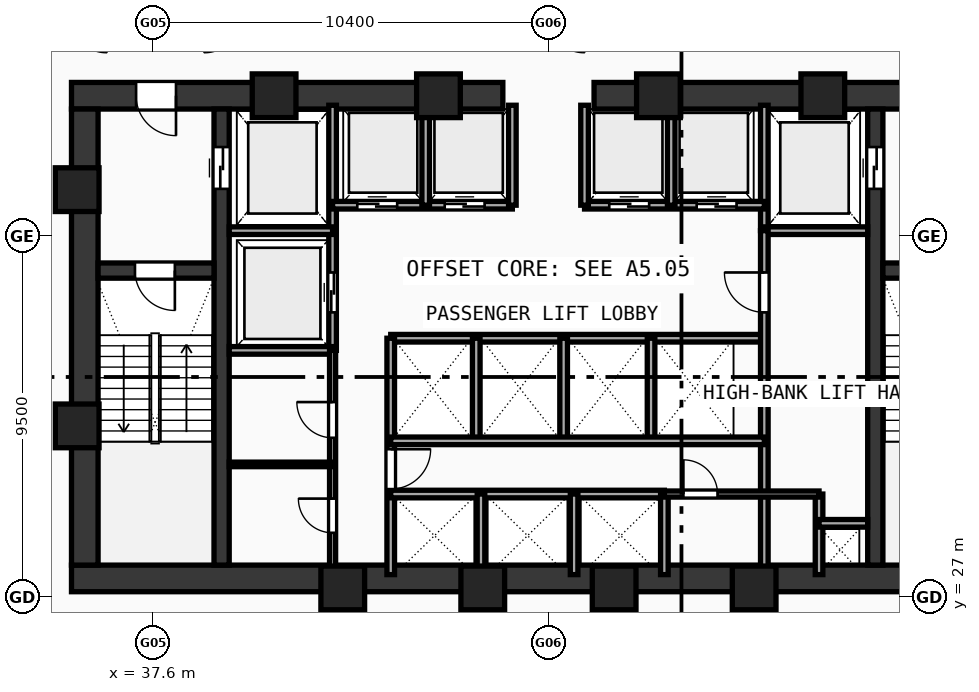
"""IFC4 building model, lengths in metres.
Left out: names, types, materials, properties, quantities, classifications, styles, units other than length and angle.
Written with IfcOpenShell. Run it as: python <this file> out.ifc"""

import sys

from ifc_helpers import new_model, si_unit, direction, frame, frame_2d, origin, origin_with_axes, origin_2d, place, context, subcontext, project, spatial, rectangle, hollow_rectangle, extrude, source, transform, mapped, element, fill, save


model = new_model("IFC4")
c1 = context("Model", 3, precision=1e-05, world=origin(), true_north=direction((0.0, 1.0)))
c2 = subcontext(c1, "Body", "Model", "MODEL_VIEW")
j1 = project(units=[si_unit("LENGTHUNIT", "METRE"), si_unit("PLANEANGLEUNIT", "RADIAN")], contexts=[c1])
p1 = place(None, origin())
s1 = spatial("IfcSite", under=j1, at=p1, CompositionType="ELEMENT")
p2 = place(p1, origin())
s2 = spatial("IfcBuilding", under=s1, at=p2, CompositionType="ELEMENT")
p3 = place(p2, frame((0.0, 0.0, 41.29)))
s3 = spatial("IfcBuildingStorey", under=s2, at=p3, CompositionType="ELEMENT", Elevation=41.29)
p4 = place(p3, frame((35.45, 27.5, 0.0), z_axis=(0.0, 0.0, 1.0), x_axis=(1.0, 0.0, 0.0)))
e1 = element("IfcWall", 1, at=p4, inside=s3, PredefinedType="SHEAR", context=c2, shape_type="SweptSolid", body=[
    extrude(rectangle(XDim=25.1, YDim=0.7, at=frame_2d((12.55, 0.0))), origin(), (0.0, 0.0, 1.0), 3.37),
])
p5 = place(p3, frame((35.45, 40.2, 0.0), z_axis=(0.0, 0.0, 1.0), x_axis=(1.0, 0.0, 0.0)))
e2 = element("IfcWall", 2, at=p5, inside=s3, PredefinedType="SHEAR", context=c2, shape_type="SweptSolid", body=[
    extrude(rectangle(XDim=11.35, YDim=0.7, at=frame_2d((5.675, 0.0))), origin(), (0.0, 0.0, 1.0), 3.37),
])
p6 = place(p5, frame((1.7, 0.0, 0.0)))
e3 = element("IfcOpeningElement", 3, at=p6, cuts=e2, PredefinedType="OPENING", context=c2, shape_type="SweptSolid", body=[
    extrude(rectangle(XDim=1.05, YDim=2.1, at=frame_2d((0.525, 1.05))), frame((0.0, 0.36, 0.0), z_axis=(0.0, -1.0, 0.0), x_axis=(1.0, 0.0, 0.0)), (0.0, 0.0, 1.0), 0.72),
])
p7 = place(p3, frame((49.2, 40.2, 0.0), z_axis=(0.0, 0.0, 1.0), x_axis=(1.0, 0.0, 0.0)))
e4 = element("IfcWall", 4, at=p7, inside=s3, PredefinedType="SHEAR", context=c2, shape_type="SweptSolid", body=[
    extrude(rectangle(XDim=11.35, YDim=0.7, at=frame_2d((5.675, 0.0))), origin(), (0.0, 0.0, 1.0), 3.37),
])
p8 = place(p7, frame((8.6, 0.0, 0.0)))
e5 = element("IfcOpeningElement", 5, at=p8, cuts=e4, PredefinedType="OPENING", context=c2, shape_type="SweptSolid", body=[
    extrude(rectangle(XDim=1.05, YDim=2.1, at=frame_2d((0.525, 1.05))), frame((0.0, 0.36, 0.0), z_axis=(0.0, -1.0, 0.0), x_axis=(1.0, 0.0, 0.0)), (0.0, 0.0, 1.0), 0.72),
])
p9 = place(p3, frame((35.8, 27.85, 0.0), z_axis=(0.0, 0.0, 1.0), x_axis=(0.0, 1.0, 0.0)))
e6 = element("IfcWall", 6, at=p9, inside=s3, PredefinedType="SHEAR", context=c2, shape_type="SweptSolid", body=[
    extrude(rectangle(XDim=12.0, YDim=0.7, at=frame_2d((6.0, 0.0))), origin(), (0.0, 0.0, 1.0), 3.37),
])
p10 = place(p3, frame((39.4, 27.85, 0.0), z_axis=(0.0, 0.0, 1.0), x_axis=(0.0, 1.0, 0.0)))
e7 = element("IfcWall", 7, at=p10, inside=s3, PredefinedType="SHEAR", context=c2, shape_type="SweptSolid", body=[
    extrude(rectangle(XDim=12.0, YDim=0.4, at=frame_2d((6.0, 0.0))), origin(), (0.0, 0.0, 1.0), 3.37),
])
p11 = place(p10, frame((9.9, 0.0, 0.0)))
e8 = element("IfcOpeningElement", 8, at=p11, cuts=e7, PredefinedType="OPENING", context=c2, shape_type="SweptSolid", body=[
    extrude(rectangle(XDim=1.1, YDim=2.1, at=frame_2d((0.55, 1.05))), frame((0.0, 0.21, 0.0), z_axis=(0.0, -1.0, 0.0), x_axis=(1.0, 0.0, 0.0)), (0.0, 0.0, 1.0), 0.42),
])
p12 = place(p3, frame((56.6, 27.85, 0.0), z_axis=(0.0, 0.0, 1.0), x_axis=(0.0, 1.0, 0.0)))
e9 = element("IfcWall", 9, at=p12, inside=s3, PredefinedType="SHEAR", context=c2, shape_type="SweptSolid", body=[
    extrude(rectangle(XDim=12.0, YDim=0.4, at=frame_2d((6.0, 0.0))), origin(), (0.0, 0.0, 1.0), 3.37),
])
p13 = place(p12, frame((9.9, 0.0, 0.0)))
e10 = element("IfcOpeningElement", 10, at=p13, cuts=e9, PredefinedType="OPENING", context=c2, shape_type="SweptSolid", body=[
    extrude(rectangle(XDim=1.1, YDim=2.1, at=frame_2d((0.55, 1.05))), frame((0.0, 0.21, 0.0), z_axis=(0.0, -1.0, 0.0), x_axis=(1.0, 0.0, 0.0)), (0.0, 0.0, 1.0), 0.42),
])
p14 = place(p3, frame((36.15, 35.6, 0.0), z_axis=(0.0, 0.0, 1.0), x_axis=(1.0, 0.0, 0.0)))
e11 = element("IfcWall", 11, at=p14, inside=s3, PredefinedType="SHEAR", context=c2, shape_type="SweptSolid", body=[
    extrude(rectangle(XDim=3.05, YDim=0.4, at=frame_2d((1.525, 0.0))), origin(), (0.0, 0.0, 1.0), 3.37),
])
p15 = place(p14, frame((0.97, 0.0, 0.0)))
e12 = element("IfcOpeningElement", 12, at=p15, cuts=e11, PredefinedType="OPENING", context=c2, shape_type="SweptSolid", body=[
    extrude(rectangle(XDim=1.05, YDim=2.1, at=frame_2d((0.525, 1.05))), frame((0.0, 0.21, 0.0), z_axis=(0.0, -1.0, 0.0), x_axis=(1.0, 0.0, 0.0)), (0.0, 0.0, 1.0), 0.42),
])
p16 = place(p3, frame((56.8, 35.6, 0.0), z_axis=(0.0, 0.0, 1.0), x_axis=(1.0, 0.0, 0.0)))
e13 = element("IfcWall", 13, at=p16, inside=s3, PredefinedType="SHEAR", context=c2, shape_type="SweptSolid", body=[
    extrude(rectangle(XDim=3.05, YDim=0.4, at=frame_2d((1.525, 0.0))), origin(), (0.0, 0.0, 1.0), 3.37),
])
p17 = place(p16, frame((1.02, 0.0, 0.0)))
e14 = element("IfcOpeningElement", 14, at=p17, cuts=e13, PredefinedType="OPENING", context=c2, shape_type="SweptSolid", body=[
    extrude(rectangle(XDim=1.05, YDim=2.1, at=frame_2d((0.525, 1.05))), frame((0.0, 0.21, 0.0), z_axis=(0.0, -1.0, 0.0), x_axis=(1.0, 0.0, 0.0)), (0.0, 0.0, 1.0), 0.42),
])
m1 = source(origin(), c2, "Body", "SweptSolid", [
    extrude(hollow_rectangle(XDim=1.15, YDim=1.15, WallThickness=0.048, at=origin_2d()), origin(), (0.0, 0.0, 1.0), 3.63),
])
for number, where, z_axis, x_axis in (
    (15, (42.588, 27.25, -0.26), (0.0, 0.0, 1.0), (1.0, 0.0, 0.0)),
    (16, (46.272, 27.25, -0.26), (0.0, 0.0, 1.0), (1.0, 0.0, 0.0)),
    (17, (49.729, 27.25, -0.26), (0.0, 0.0, 1.0), (1.0, 0.0, 0.0)),
    (18, (53.412, 27.25, -0.26), (0.0, 0.0, 1.0), (1.0, 0.0, 0.0)),
    (19, (55.219, 40.2, -0.26), (0.0, 0.0, 1.0), (1.0, 0.0, 0.0)),
    (20, (50.894, 40.2, -0.26), (0.0, 0.0, 1.0), (1.0, 0.0, 0.0)),
    (21, (45.106, 40.2, -0.26), (0.0, 0.0, 1.0), (1.0, 0.0, 0.0)),
    (22, (40.781, 40.2, -0.26), (0.0, 0.0, 1.0), (1.0, 0.0, 0.0)),
    (23, (35.6, 37.729, -0.26), (0.0, 0.0, 1.0), (1.0, 0.0, 0.0)),
    (24, (35.6, 31.513, -0.26), (0.0, 0.0, 1.0), (1.0, 0.0, 0.0)),
):
    element("IfcColumn", number, at=place(p3, frame(where, z_axis=z_axis, x_axis=x_axis)), inside=s3, PredefinedType="COLUMN", context=c2, shape_type="MappedRepresentation", body=[
        mapped(m1, transform((0.0, 0.0, 0.0), scale=1.0)),
    ])
p18 = place(p3, frame((42.32, 33.5, 0.0), z_axis=(0.0, 0.0, 1.0), x_axis=(0.0, 1.0, 0.0)))
e25 = element("IfcWall", 25, at=p18, inside=s3, PredefinedType="SOLIDWALL", context=c2, shape_type="SweptSolid", body=[
    extrude(rectangle(XDim=6.45, YDim=0.2, at=frame_2d((3.225, 0.0))), origin(), (0.0, 0.0, 1.0), 3.37),
])
p19 = place(p18, frame((1.0, 0.0, 0.0)))
e26 = element("IfcOpeningElement", 26, at=p19, cuts=e25, PredefinedType="OPENING", context=c2, shape_type="SweptSolid", body=[
    extrude(rectangle(XDim=1.05, YDim=2.1, at=frame_2d((0.525, 1.05))), frame((0.0, 0.11, 0.0), z_axis=(0.0, -1.0, 0.0), x_axis=(1.0, 0.0, 0.0)), (0.0, 0.0, 1.0), 0.22),
])
for number, where, z_axis, x_axis in (
    (27, (39.6, 36.65, 0.0), (0.0, 0.0, 1.0), (1.0, 0.0, 0.0)),
    (28, (39.6, 33.5, 0.0), (0.0, 0.0, 1.0), (1.0, 0.0, 0.0)),
):
    element("IfcWall", number, at=place(p3, frame(where, z_axis=z_axis, x_axis=x_axis)), inside=s3, PredefinedType="SOLIDWALL", context=c2, shape_type="SweptSolid", body=[
        extrude(rectangle(XDim=2.72, YDim=0.2, at=frame_2d((1.36, 0.0))), origin(), (0.0, 0.0, 1.0), 3.37),
    ])
p20 = place(p3, frame((53.68, 36.65, 0.0), z_axis=(0.0, 0.0, 1.0), x_axis=(0.0, 1.0, 0.0)))
e29 = element("IfcWall", 29, at=p20, inside=s3, PredefinedType="SOLIDWALL", context=c2, shape_type="SweptSolid", body=[
    extrude(rectangle(XDim=3.3, YDim=0.2, at=frame_2d((1.65, 0.0))), origin(), (0.0, 0.0, 1.0), 3.37),
])
p21 = place(p3, frame((53.68, 36.65, 0.0), z_axis=(0.0, 0.0, 1.0), x_axis=(1.0, 0.0, 0.0)))
e30 = element("IfcWall", 30, at=p21, inside=s3, PredefinedType="SOLIDWALL", context=c2, shape_type="SweptSolid", body=[
    extrude(rectangle(XDim=2.72, YDim=0.2, at=frame_2d((1.36, 0.0))), origin(), (0.0, 0.0, 1.0), 3.37),
])
p22 = place(p3, frame((42.32, 37.32, 0.0), z_axis=(0.0, 0.0, 1.0), x_axis=(1.0, 0.0, 0.0)))
e31 = element("IfcWall", 31, at=p22, inside=s3, PredefinedType="SOLIDWALL", context=c2, shape_type="SweptSolid", body=[
    extrude(rectangle(XDim=4.73, YDim=0.2, at=frame_2d((2.365, 0.0))), origin(), (0.0, 0.0, 1.0), 3.37),
])
p23 = place(p22, frame((0.65, 0.0, 0.0)))
e32 = element("IfcOpeningElement", 32, at=p23, cuts=e31, PredefinedType="OPENING", context=c2, shape_type="SweptSolid", body=[
    extrude(rectangle(XDim=1.05, YDim=2.1, at=frame_2d((0.525, 1.05))), frame((0.0, 0.11, 0.0), z_axis=(0.0, -1.0, 0.0), x_axis=(1.0, 0.0, 0.0)), (0.0, 0.0, 1.0), 0.22),
])
p24 = place(p22, frame((2.95, 0.0, 0.0)))
e33 = element("IfcOpeningElement", 33, at=p24, cuts=e31, PredefinedType="OPENING", context=c2, shape_type="SweptSolid", body=[
    extrude(rectangle(XDim=1.05, YDim=2.1, at=frame_2d((0.525, 1.05))), frame((0.0, 0.11, 0.0), z_axis=(0.0, -1.0, 0.0), x_axis=(1.0, 0.0, 0.0)), (0.0, 0.0, 1.0), 0.22),
])
p25 = place(p3, frame((48.95, 37.32, 0.0), z_axis=(0.0, 0.0, 1.0), x_axis=(1.0, 0.0, 0.0)))
e34 = element("IfcWall", 34, at=p25, inside=s3, PredefinedType="SOLIDWALL", context=c2, shape_type="SweptSolid", body=[
    extrude(rectangle(XDim=4.73, YDim=0.2, at=frame_2d((2.365, 0.0))), origin(), (0.0, 0.0, 1.0), 3.37),
])
p26 = place(p25, frame((0.65, 0.0, 0.0)))
e35 = element("IfcOpeningElement", 35, at=p26, cuts=e34, PredefinedType="OPENING", context=c2, shape_type="SweptSolid", body=[
    extrude(rectangle(XDim=1.05, YDim=2.1, at=frame_2d((0.525, 1.05))), frame((0.0, 0.11, 0.0), z_axis=(0.0, -1.0, 0.0), x_axis=(1.0, 0.0, 0.0)), (0.0, 0.0, 1.0), 0.22),
])
p27 = place(p25, frame((2.95, 0.0, 0.0)))
e36 = element("IfcOpeningElement", 36, at=p27, cuts=e34, PredefinedType="OPENING", context=c2, shape_type="SweptSolid", body=[
    extrude(rectangle(XDim=1.05, YDim=2.1, at=frame_2d((0.525, 1.05))), frame((0.0, 0.11, 0.0), z_axis=(0.0, -1.0, 0.0), x_axis=(1.0, 0.0, 0.0)), (0.0, 0.0, 1.0), 0.22),
])
for number, where, z_axis, x_axis in (
    (37, (47.05, 37.32, 0.0), (0.0, 0.0, 1.0), (0.0, 1.0, 0.0)),
    (38, (48.95, 37.32, 0.0), (0.0, 0.0, 1.0), (0.0, 1.0, 0.0)),
    (39, (44.77, 37.32, 0.0), (0.0, 0.0, 1.0), (0.0, 1.0, 0.0)),
    (40, (51.23, 37.32, 0.0), (0.0, 0.0, 1.0), (0.0, 1.0, 0.0)),
):
    element("IfcWall", number, at=place(p3, frame(where, z_axis=z_axis, x_axis=x_axis)), inside=s3, PredefinedType="SOLIDWALL", context=c2, shape_type="SweptSolid", body=[
        extrude(rectangle(XDim=2.63, YDim=0.2, at=frame_2d((1.315, 0.0))), origin(), (0.0, 0.0, 1.0), 3.37),
    ])
p28 = place(p3, frame((43.85, 33.82, 0.0), z_axis=(0.0, 0.0, 1.0), x_axis=(1.0, 0.0, 0.0)))
e41 = element("IfcWall", 41, at=p28, inside=s3, PredefinedType="SOLIDWALL", context=c2, shape_type="SweptSolid", body=[
    extrude(rectangle(XDim=9.83, YDim=0.2, at=frame_2d((4.915, 0.0))), origin(), (0.0, 0.0, 1.0), 3.37),
])
p29 = place(p3, frame((43.85, 27.6, 0.0), z_axis=(0.0, 0.0, 1.0), x_axis=(0.0, 1.0, 0.0)))
e42 = element("IfcWall", 42, at=p29, inside=s3, PredefinedType="SOLIDWALL", context=c2, shape_type="SweptSolid", body=[
    extrude(rectangle(XDim=6.22, YDim=0.2, at=frame_2d((3.11, 0.0))), origin(), (0.0, 0.0, 1.0), 3.37),
])
p30 = place(p29, frame((2.25, 0.0, 0.0)))
e43 = element("IfcOpeningElement", 43, at=p30, cuts=e42, PredefinedType="OPENING", context=c2, shape_type="SweptSolid", body=[
    extrude(rectangle(XDim=1.05, YDim=2.1, at=frame_2d((0.525, 1.05))), frame((0.0, 0.11, 0.0), z_axis=(0.0, -1.0, 0.0), x_axis=(1.0, 0.0, 0.0)), (0.0, 0.0, 1.0), 0.22),
])
p31 = place(p3, frame((53.68, 27.6, 0.0), z_axis=(0.0, 0.0, 1.0), x_axis=(0.0, 1.0, 0.0)))
e44 = element("IfcWall", 44, at=p31, inside=s3, PredefinedType="SOLIDWALL", context=c2, shape_type="SweptSolid", body=[
    extrude(rectangle(XDim=9.05, YDim=0.2, at=frame_2d((4.525, 0.0))), origin(), (0.0, 0.0, 1.0), 3.37),
])
p32 = place(p31, frame((6.9, 0.0, 0.0)))
e45 = element("IfcOpeningElement", 45, at=p32, cuts=e44, PredefinedType="OPENING", context=c2, shape_type="SweptSolid", body=[
    extrude(rectangle(XDim=1.05, YDim=2.1, at=frame_2d((0.525, 1.05))), frame((0.0, 0.11, 0.0), z_axis=(0.0, -1.0, 0.0), x_axis=(1.0, 0.0, 0.0)), (0.0, 0.0, 1.0), 0.22),
])
for number, where, z_axis, x_axis in (
    (46, (46.1, 31.12, 0.0), (0.0, 0.0, 1.0), (0.0, 1.0, 0.0)),
    (47, (48.4, 31.12, 0.0), (0.0, 0.0, 1.0), (0.0, 1.0, 0.0)),
    (48, (50.7, 31.12, 0.0), (0.0, 0.0, 1.0), (0.0, 1.0, 0.0)),
):
    element("IfcWall", number, at=place(p3, frame(where, z_axis=z_axis, x_axis=x_axis)), inside=s3, PredefinedType="SOLIDWALL", context=c2, shape_type="SweptSolid", body=[
        extrude(rectangle(XDim=2.7, YDim=0.2, at=frame_2d((1.35, 0.0))), origin(), (0.0, 0.0, 1.0), 3.37),
    ])
p33 = place(p3, frame((43.85, 29.72, 0.0), z_axis=(0.0, 0.0, 1.0), x_axis=(1.0, 0.0, 0.0)))
e49 = element("IfcWall", 49, at=p33, inside=s3, PredefinedType="SOLIDWALL", context=c2, shape_type="SweptSolid", body=[
    extrude(rectangle(XDim=7.2, YDim=0.2, at=frame_2d((3.6, 0.0))), origin(), (0.0, 0.0, 1.0), 3.37),
])
p34 = place(p3, frame((51.05, 27.6, 0.0), z_axis=(0.0, 0.0, 1.0), x_axis=(0.0, 1.0, 0.0)))
e50 = element("IfcWall", 50, at=p34, inside=s3, PredefinedType="SOLIDWALL", context=c2, shape_type="SweptSolid", body=[
    extrude(rectangle(XDim=2.12, YDim=0.2, at=frame_2d((1.06, 0.0))), origin(), (0.0, 0.0, 1.0), 3.37),
])
p35 = place(p3, frame((43.85, 31.12, 0.0), z_axis=(0.0, 0.0, 1.0), x_axis=(1.0, 0.0, 0.0)))
e51 = element("IfcWall", 51, at=p35, inside=s3, PredefinedType="SOLIDWALL", context=c2, shape_type="SweptSolid", body=[
    extrude(rectangle(XDim=9.83, YDim=0.2, at=frame_2d((4.915, 0.0))), origin(), (0.0, 0.0, 1.0), 3.37),
])
for number, where, z_axis, x_axis in (
    (52, (46.225, 27.6, 0.0), (0.0, 0.0, 1.0), (0.0, 1.0, 0.0)),
    (53, (48.675, 27.6, 0.0), (0.0, 0.0, 1.0), (0.0, 1.0, 0.0)),
    (54, (55.12, 27.6, 0.0), (0.0, 0.0, 1.0), (0.0, 1.0, 0.0)),
):
    element("IfcWall", number, at=place(p3, frame(where, z_axis=z_axis, x_axis=x_axis)), inside=s3, PredefinedType="SOLIDWALL", context=c2, shape_type="SweptSolid", body=[
        extrude(rectangle(XDim=2.12, YDim=0.2, at=frame_2d((1.06, 0.0))), origin(), (0.0, 0.0, 1.0), 3.37),
    ])
p36 = place(p3, frame((55.12, 28.95, 0.0), z_axis=(0.0, 0.0, 1.0), x_axis=(1.0, 0.0, 0.0)))
e55 = element("IfcWall", 55, at=p36, inside=s3, PredefinedType="SOLIDWALL", context=c2, shape_type="SweptSolid", body=[
    extrude(rectangle(XDim=1.28, YDim=0.2, at=frame_2d((0.64, 0.0))), origin(), (0.0, 0.0, 1.0), 3.37),
])
p37 = place(p3, frame((42.32, 27.6, 0.0), z_axis=(0.0, 0.0, 1.0), x_axis=(0.0, 1.0, 0.0)))
e56 = element("IfcWall", 56, at=p37, inside=s3, PredefinedType="PARTITIONING", context=c2, shape_type="SweptSolid", body=[
    extrude(rectangle(XDim=5.9, YDim=0.16, at=frame_2d((2.95, 0.0))), origin(), (0.0, 0.0, 1.0), 3.37),
])
p38 = place(p37, frame((1.1, 0.0, 0.0)))
e57 = element("IfcOpeningElement", 57, at=p38, cuts=e56, PredefinedType="OPENING", context=c2, shape_type="SweptSolid", body=[
    extrude(rectangle(XDim=0.9, YDim=2.1, at=frame_2d((0.45, 1.05))), frame((0.0, 0.09, 0.0), z_axis=(0.0, -1.0, 0.0), x_axis=(1.0, 0.0, 0.0)), (0.0, 0.0, 1.0), 0.18),
])
p39 = place(p37, frame((3.6, 0.0, 0.0)))
e58 = element("IfcOpeningElement", 58, at=p39, cuts=e56, PredefinedType="OPENING", context=c2, shape_type="SweptSolid", body=[
    extrude(rectangle(XDim=0.94, YDim=2.1, at=frame_2d((0.47, 1.05))), frame((0.0, 0.09, 0.0), z_axis=(0.0, -1.0, 0.0), x_axis=(1.0, 0.0, 0.0)), (0.0, 0.0, 1.0), 0.18),
])
p40 = place(p3, frame((51.05, 29.72, 0.0), z_axis=(0.0, 0.0, 1.0), x_axis=(1.0, 0.0, 0.0)))
e59 = element("IfcWall", 59, at=p40, inside=s3, PredefinedType="PARTITIONING", context=c2, shape_type="SweptSolid", body=[
    extrude(rectangle(XDim=4.07, YDim=0.16, at=frame_2d((2.035, 0.0))), origin(), (0.0, 0.0, 1.0), 3.37),
])
p41 = place(p40, frame((0.5, 0.0, 0.0)))
e60 = element("IfcOpeningElement", 60, at=p41, cuts=e59, PredefinedType="OPENING", context=c2, shape_type="SweptSolid", body=[
    extrude(rectangle(XDim=0.9, YDim=2.1, at=frame_2d((0.45, 1.05))), frame((0.0, 0.09, 0.0), z_axis=(0.0, -1.0, 0.0), x_axis=(1.0, 0.0, 0.0)), (0.0, 0.0, 1.0), 0.18),
])
p42 = place(p3, frame((39.6, 30.5, 0.0), z_axis=(0.0, 0.0, 1.0), x_axis=(1.0, 0.0, 0.0)))
e61 = element("IfcWall", 61, at=p42, inside=s3, PredefinedType="PARTITIONING", context=c2, shape_type="SweptSolid", body=[
    extrude(rectangle(XDim=2.72, YDim=0.12, at=frame_2d((1.36, 0.0))), origin(), (0.0, 0.0, 1.0), 3.37),
])
m2 = source(origin(), c2, "Body", "SweptSolid", [
    extrude(rectangle(XDim=1.05, YDim=2.1, at=frame_2d((0.525, 1.05))), frame((0.0, 0.025, 0.0), z_axis=(0.0, -1.0, 0.0), x_axis=(1.0, 0.0, 0.0)), (0.0, 0.0, 1.0), 0.05),
])
p43 = place(p15, frame((1.05, 0.0, 0.0), z_axis=(0.0, 0.0, 1.0), x_axis=(-1.0, 0.0, 0.0)))
e62 = element("IfcDoor", 62, at=p43, inside=s3, OperationType="SINGLE_SWING_LEFT", PredefinedType="DOOR", context=c2, shape_type="MappedRepresentation", body=[
    mapped(m2, transform((0.0, 0.0, 0.0), scale=1.0)),
])
fill(e12, e62)
p44 = place(p6, frame((1.05, 0.0, 0.0), z_axis=(0.0, 0.0, 1.0), x_axis=(-1.0, 0.0, 0.0)))
e63 = element("IfcDoor", 63, at=p44, inside=s3, OperationType="SINGLE_SWING_LEFT", PredefinedType="DOOR", context=c2, shape_type="MappedRepresentation", body=[
    mapped(m2, transform((0.0, 0.0, 0.0), scale=1.0)),
])
fill(e3, e63)
m3 = source(origin(), c2, "Body", "SweptSolid", [
    extrude(rectangle(XDim=1.1, YDim=2.1, at=frame_2d((0.55, 1.05))), frame((0.0, 0.025, 0.0), z_axis=(0.0, -1.0, 0.0), x_axis=(1.0, 0.0, 0.0)), (0.0, 0.0, 1.0), 0.05),
])
p45 = place(p11, frame((1.1, 0.0, 0.0), z_axis=(0.0, 0.0, 1.0), x_axis=(-1.0, 0.0, 0.0)))
e64 = element("IfcDoor", 64, at=p45, inside=s3, OperationType="DOUBLE_DOOR_SLIDING", PredefinedType="DOOR", context=c2, shape_type="MappedRepresentation", body=[
    mapped(m3, transform((0.0, 0.0, 0.0), scale=1.0)),
])
fill(e8, e64)
p46 = place(p13, origin_with_axes())
e65 = element("IfcDoor", 65, at=p46, inside=s3, OperationType="DOUBLE_DOOR_SLIDING", PredefinedType="DOOR", context=c2, shape_type="MappedRepresentation", body=[
    mapped(m3, transform((0.0, 0.0, 0.0), scale=1.0)),
])
fill(e10, e65)
p47 = place(p19, origin_with_axes())
e66 = element("IfcDoor", 66, at=p47, inside=s3, OperationType="DOUBLE_DOOR_SLIDING", PredefinedType="DOOR", context=c2, shape_type="MappedRepresentation", body=[
    mapped(m2, transform((0.0, 0.0, 0.0), scale=1.0)),
])
fill(e26, e66)
p48 = place(p23, frame((1.05, 0.0, 0.0), z_axis=(0.0, 0.0, 1.0), x_axis=(-1.0, 0.0, 0.0)))
e67 = element("IfcDoor", 67, at=p48, inside=s3, OperationType="DOUBLE_DOOR_SLIDING", PredefinedType="DOOR", context=c2, shape_type="MappedRepresentation", body=[
    mapped(m2, transform((0.0, 0.0, 0.0), scale=1.0)),
])
fill(e32, e67)
p49 = place(p24, frame((1.05, 0.0, 0.0), z_axis=(0.0, 0.0, 1.0), x_axis=(-1.0, 0.0, 0.0)))
e68 = element("IfcDoor", 68, at=p49, inside=s3, OperationType="DOUBLE_DOOR_SLIDING", PredefinedType="DOOR", context=c2, shape_type="MappedRepresentation", body=[
    mapped(m2, transform((0.0, 0.0, 0.0), scale=1.0)),
])
fill(e33, e68)
p50 = place(p26, frame((1.05, 0.0, 0.0), z_axis=(0.0, 0.0, 1.0), x_axis=(-1.0, 0.0, 0.0)))
e69 = element("IfcDoor", 69, at=p50, inside=s3, OperationType="DOUBLE_DOOR_SLIDING", PredefinedType="DOOR", context=c2, shape_type="MappedRepresentation", body=[
    mapped(m2, transform((0.0, 0.0, 0.0), scale=1.0)),
])
fill(e35, e69)
p51 = place(p27, frame((1.05, 0.0, 0.0), z_axis=(0.0, 0.0, 1.0), x_axis=(-1.0, 0.0, 0.0)))
e70 = element("IfcDoor", 70, at=p51, inside=s3, OperationType="DOUBLE_DOOR_SLIDING", PredefinedType="DOOR", context=c2, shape_type="MappedRepresentation", body=[
    mapped(m2, transform((0.0, 0.0, 0.0), scale=1.0)),
])
fill(e36, e70)
p52 = place(p30, frame((1.05, 0.0, 0.0), z_axis=(0.0, 0.0, 1.0), x_axis=(-1.0, 0.0, 0.0)))
e71 = element("IfcDoor", 71, at=p52, inside=s3, OperationType="SINGLE_SWING_LEFT", PredefinedType="DOOR", context=c2, shape_type="MappedRepresentation", body=[
    mapped(m2, transform((0.0, 0.0, 0.0), scale=1.0)),
])
fill(e43, e71)
p53 = place(p32, origin_with_axes())
e72 = element("IfcDoor", 72, at=p53, inside=s3, OperationType="SINGLE_SWING_RIGHT", PredefinedType="DOOR", context=c2, shape_type="MappedRepresentation", body=[
    mapped(m2, transform((0.0, 0.0, 0.0), scale=1.0)),
])
fill(e45, e72)
m4 = source(origin(), c2, "Body", "SweptSolid", [
    extrude(rectangle(XDim=0.9, YDim=2.1, at=frame_2d((0.45, 1.05))), frame((0.0, 0.025, 0.0), z_axis=(0.0, -1.0, 0.0), x_axis=(1.0, 0.0, 0.0)), (0.0, 0.0, 1.0), 0.05),
])
p54 = place(p38, origin_with_axes())
e73 = element("IfcDoor", 73, at=p54, inside=s3, OperationType="SINGLE_SWING_RIGHT", PredefinedType="DOOR", context=c2, shape_type="MappedRepresentation", body=[
    mapped(m4, transform((0.0, 0.0, 0.0), scale=1.0)),
])
fill(e57, e73)
m5 = source(origin(), c2, "Body", "SweptSolid", [
    extrude(rectangle(XDim=0.94, YDim=2.1, at=frame_2d((0.47, 1.05))), frame((0.0, 0.025, 0.0), z_axis=(0.0, -1.0, 0.0), x_axis=(1.0, 0.0, 0.0)), (0.0, 0.0, 1.0), 0.05),
])
p55 = place(p39, origin_with_axes())
e74 = element("IfcDoor", 74, at=p55, inside=s3, OperationType="SINGLE_SWING_RIGHT", PredefinedType="DOOR", context=c2, shape_type="MappedRepresentation", body=[
    mapped(m5, transform((0.0, 0.0, 0.0), scale=1.0)),
])
fill(e58, e74)
p56 = place(p41, origin_with_axes())
e75 = element("IfcDoor", 75, at=p56, inside=s3, OperationType="SINGLE_SWING_LEFT", PredefinedType="DOOR", context=c2, shape_type="MappedRepresentation", body=[
    mapped(m4, transform((0.0, 0.0, 0.0), scale=1.0)),
])
fill(e60, e75)
save(model, sys.argv[1])
